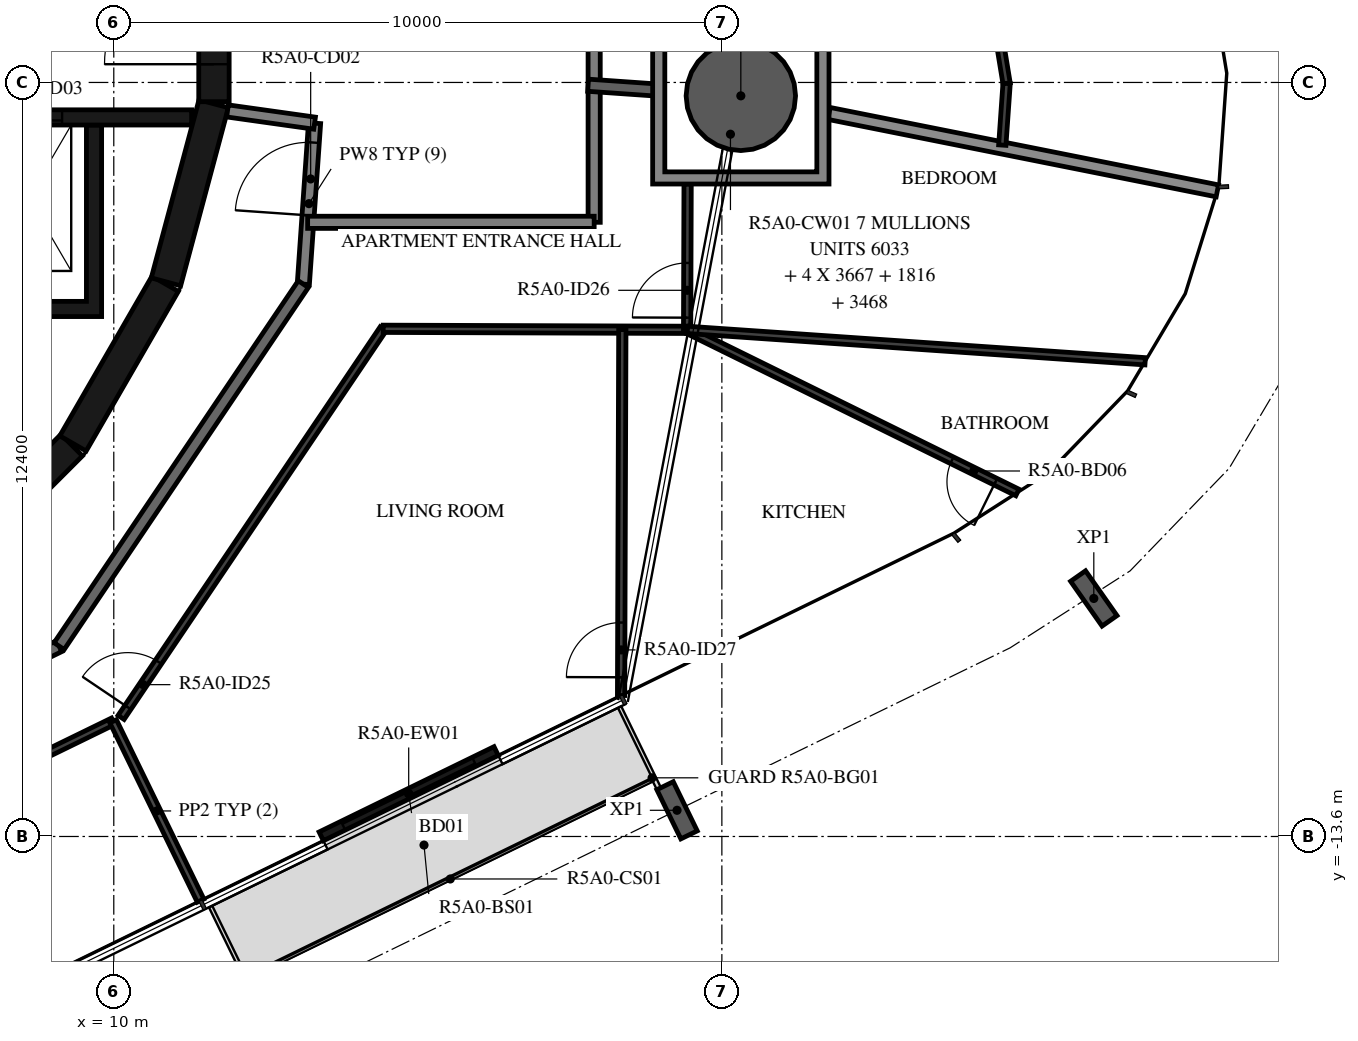
"""IFC4 building model, lengths in metres.
Left out: names, types, materials, properties, quantities, classifications, styles, units other than length and angle.
Written with IfcOpenShell. Run it as: python <this file> out.ifc"""

import sys

from ifc_helpers import new_model, si_unit, direction, frame, frame_2d, origin, origin_2d, place, context, subcontext, project, spatial, polyline, rectangle, hollow_circle, i_section, outline, extrude, element, fill, save


model = new_model("IFC4")
c1 = context("Model", 3, precision=1e-05, world=origin(), true_north=direction((0.0, 1.0)))
c2 = subcontext(c1, "Body", "Model", "MODEL_VIEW")
j1 = project(units=[si_unit("LENGTHUNIT", "METRE"), si_unit("PLANEANGLEUNIT", "RADIAN")], contexts=[c1])
p1 = place(None, origin())
s1 = spatial("IfcSite", under=j1, at=p1, CompositionType="ELEMENT")
p2 = place(p1, origin())
s2 = spatial("IfcBuilding", under=s1, at=p2, CompositionType="ELEMENT")
p3 = place(p2, frame((0.0, 0.0, 195.4)))
s3 = spatial("IfcBuildingStorey", under=s2, at=p3, CompositionType="ELEMENT", Elevation=195.4)
p4 = place(p3, frame((20.312, -1.42, -0.38), z_axis=(0.0, 0.0, 1.0), x_axis=(1.0, 0.0, 0.0)))
e1 = element("IfcColumn", 1, at=p4, inside=s3, PredefinedType="COLUMN", context=c2, shape_type="SweptSolid", body=[
    extrude(hollow_circle(Radius=0.9, WallThickness=0.04, at=origin_2d()), origin(), (0.0, 0.0, 1.0), 3.5),
])
for number, where, z_axis, x_axis in (
    (2, (19.263, -13.169, -0.38), (0.0, 0.0, 1.0), (-0.899, -0.438, 0.0)),
    (3, (26.117, -9.686, -0.38), (0.0, 0.0, 1.0), (-0.818, -0.575, 0.0)),
):
    element("IfcColumn", number, at=place(p3, frame(where, z_axis=z_axis, x_axis=x_axis)), inside=s3, PredefinedType="COLUMN", context=c2, shape_type="SweptSolid", body=[
        extrude(i_section(OverallWidth=0.3, OverallDepth=0.9, WebThickness=0.019, FlangeThickness=0.035, FilletRadius=0.03, at=origin_2d()), origin(), (0.0, 0.0, 1.0), 3.5),
    ])
p5 = place(p3, frame((13.412, -13.598, 0.0), z_axis=(0.0, 0.0, 1.0), x_axis=(0.898793373747, 0.438372525723, 0.0)))
e4 = element("IfcWall", 4, at=p5, inside=s3, PredefinedType="STANDARD", context=c2, shape_type="SweptSolid", body=[
    extrude(rectangle(XDim=3.2, YDim=0.16, at=frame_2d((1.6, 0.0))), origin(), (0.0, 0.0, 1.0), 3.12),
])
p6 = place(p5, frame((0.4, 0.0, 0.0)))
e5 = element("IfcOpeningElement", 5, at=p6, cuts=e4, PredefinedType="OPENING", context=c2, shape_type="SweptSolid", body=[
    extrude(rectangle(XDim=2.4, YDim=2.4, at=frame_2d((1.2, 1.2))), frame((0.0, 0.09, 0.0), z_axis=(0.0, -1.0, 0.0), x_axis=(1.0, 0.0, 0.0)), (0.0, 0.0, 1.0), 0.18),
])
p7 = place(p3, frame((7.164, -9.308, 0.0), z_axis=(0.0, 0.0, 1.0), x_axis=(0.707106781187, 0.707106781187, 0.0)))
e6 = element("IfcWall", 6, at=p7, inside=s3, PredefinedType="SHEAR", context=c2, shape_type="SweptSolid", body=[
    extrude(rectangle(XDim=3.032, YDim=0.5, at=frame_2d((1.516, 0.0))), origin(), (0.0, 0.0, 1.0), 3.12),
])
for number, where, z_axis, x_axis in (
    (7, (9.329, -7.137, 0.0), (0.0, 0.0, 1.0), (0.5, 0.866, 0.0)),
    (8, (10.858, -4.479, 0.0), (0.0, 0.0, 1.0), (0.259, 0.966, 0.0)),
):
    element("IfcWall", number, at=place(p3, frame(where, z_axis=z_axis, x_axis=x_axis)), inside=s3, PredefinedType="SHEAR", context=c2, shape_type="SweptSolid", body=[
        extrude(rectangle(XDim=3.033, YDim=0.5, at=frame_2d((1.516, 0.0))), origin(), (0.0, 0.0, 1.0), 3.12),
    ])
p8 = place(p3, frame((11.647, -1.516, 0.0), z_axis=(0.0, 0.0, 1.0), x_axis=(0.0, 1.0, 0.0)))
e9 = element("IfcWall", 9, at=p8, inside=s3, PredefinedType="SHEAR", context=c2, shape_type="SweptSolid", body=[
    extrude(rectangle(XDim=3.033, YDim=0.5, at=frame_2d((1.516, 0.0))), origin(), (0.0, 0.0, 1.0), 3.12),
])
p9 = place(p8, frame((0.616, 0.0, 0.0)))
e10 = element("IfcOpeningElement", 10, at=p9, cuts=e9, PredefinedType="OPENING", context=c2, shape_type="SweptSolid", body=[
    extrude(rectangle(XDim=1.8, YDim=2.1, at=frame_2d((0.9, 1.05))), frame((0.0, 0.26, 0.0), z_axis=(0.0, -1.0, 0.0), x_axis=(1.0, 0.0, 0.0)), (0.0, 0.0, 1.0), 0.52),
])
p10 = place(p3, origin())
e11 = element("IfcWall", 11, at=p10, inside=s3, PredefinedType="SHEAR", context=c2, shape_type="SweptSolid", body=[
    extrude(outline(polyline([(9.8, -5.05), (9.8, -4.8), (9.8, -1.9), (9.55, -1.9), (9.55, -4.8), (7.65, -4.8), (7.65, -1.9), (7.4, -1.9), (7.4, -4.8), (5.5, -4.8), (5.5, -1.9), (5.25, -1.9), (5.25, -4.8), (3.35, -4.8), (3.35, -1.9), (3.1, -1.9), (3.1, -4.8), (1.2, -4.8), (1.2, -1.9), (0.95, -1.9), (0.95, -4.8), (-0.95, -4.8), (-0.95, -1.9), (-1.2, -1.9), (-1.2, -4.8), (-3.1, -4.8), (-3.1, -1.9), (-3.35, -1.9), (-3.35, -4.8), (-5.25, -4.8), (-5.25, -1.9), (-5.5, -1.9), (-5.5, -4.8), (-7.4, -4.8), (-7.4, -1.9), (-7.65, -1.9), (-7.65, -4.8), (-9.55, -4.8), (-9.55, -1.9), (-9.8, -1.9), (-9.8, -4.8), (-9.8, -5.05), (9.8, -5.05)])), origin(), (0.0, 0.0, 1.0), 3.12),
])
p11 = place(p3, frame((3.35, -1.775, 0.0), z_axis=(0.0, 0.0, 1.0), x_axis=(1.0, 0.0, 0.0)))
e12 = element("IfcWall", 12, at=p11, inside=s3, PredefinedType="SHEAR", context=c2, shape_type="SweptSolid", body=[
    extrude(rectangle(XDim=7.93, YDim=0.25, at=frame_2d((3.965, 0.0))), origin(), (0.0, 0.0, 1.0), 3.12),
])
p12 = place(p11, frame((0.4, 0.0, 0.0)))
e13 = element("IfcOpeningElement", 13, at=p12, cuts=e12, PredefinedType="OPENING", context=c2, shape_type="SweptSolid", body=[
    extrude(rectangle(XDim=1.1, YDim=2.4, at=frame_2d((0.55, 1.2))), frame((0.0, 0.135, 0.0), z_axis=(0.0, -1.0, 0.0), x_axis=(1.0, 0.0, 0.0)), (0.0, 0.0, 1.0), 0.27),
])
p13 = place(p11, frame((2.55, 0.0, 0.0)))
e14 = element("IfcOpeningElement", 14, at=p13, cuts=e12, PredefinedType="OPENING", context=c2, shape_type="SweptSolid", body=[
    extrude(rectangle(XDim=1.1, YDim=2.4, at=frame_2d((0.55, 1.2))), frame((0.0, 0.135, 0.0), z_axis=(0.0, -1.0, 0.0), x_axis=(1.0, 0.0, 0.0)), (0.0, 0.0, 1.0), 0.27),
])
p14 = place(p11, frame((4.7, 0.0, 0.0)))
e15 = element("IfcOpeningElement", 15, at=p14, cuts=e12, PredefinedType="OPENING", context=c2, shape_type="SweptSolid", body=[
    extrude(rectangle(XDim=1.1, YDim=2.4, at=frame_2d((0.55, 1.2))), frame((0.0, 0.135, 0.0), z_axis=(0.0, -1.0, 0.0), x_axis=(1.0, 0.0, 0.0)), (0.0, 0.0, 1.0), 0.27),
])
p15 = place(p3, frame((13.117, -4.517, 0.0), z_axis=(0.0, 0.0, 1.0), x_axis=(0.069736659613, 0.997565435601, 0.0)))
e16 = element("IfcWall", 16, at=p15, inside=s3, PredefinedType="STANDARD", context=c2, shape_type="SweptSolid", body=[
    extrude(rectangle(XDim=2.654, YDim=0.2, at=frame_2d((1.327, 0.0))), origin(), (0.0, 0.0, 1.0), 3.12),
])
p16 = place(p15, frame((1.134, 0.0, 0.0)))
e17 = element("IfcOpeningElement", 17, at=p16, cuts=e16, PredefinedType="OPENING", context=c2, shape_type="SweptSolid", body=[
    extrude(rectangle(XDim=1.2, YDim=2.1, at=frame_2d((0.6, 1.05))), frame((0.0, 0.11, 0.0), z_axis=(0.0, -1.0, 0.0), x_axis=(1.0, 0.0, 0.0)), (0.0, 0.0, 1.0), 0.22),
])
p17 = place(p3, frame((13.302, -1.869, 0.0), z_axis=(0.0, 0.0, 1.0), x_axis=(-0.990274397042, 0.13912806533, 0.0)))
e18 = element("IfcWall", 18, at=p17, inside=s3, PredefinedType="STANDARD", context=c2, shape_type="SweptSolid", body=[
    extrude(rectangle(XDim=1.446, YDim=0.2, at=frame_2d((0.723, 0.0))), origin(), (0.0, 0.0, 1.0), 3.12),
])
p18 = place(p3, frame((2.647, -13.618, 0.0), z_axis=(0.0, 0.0, 1.0), x_axis=(0.898796543751, 0.438366026218, 0.0)))
e19 = element("IfcWall", 19, at=p18, inside=s3, PredefinedType="STANDARD", context=c2, shape_type="SweptSolid", body=[
    extrude(rectangle(XDim=7.181, YDim=0.2, at=frame_2d((3.591, 0.0))), origin(), (0.0, 0.0, 1.0), 3.12),
])
p19 = place(p18, frame((0.2, 0.0, 0.0)))
e20 = element("IfcOpeningElement", 20, at=p19, cuts=e19, PredefinedType="OPENING", context=c2, shape_type="SweptSolid", body=[
    extrude(rectangle(XDim=1.0, YDim=2.1, at=frame_2d((0.5, 1.05))), frame((0.0, 0.11, 0.0), z_axis=(0.0, -1.0, 0.0), x_axis=(1.0, 0.0, 0.0)), (0.0, 0.0, 1.0), 0.22),
])
p20 = place(p3, frame((9.101, -10.47, 0.0), z_axis=(0.0, 0.0, 1.0), x_axis=(0.559195469534, 0.829035841718, 0.0)))
e21 = element("IfcWall", 21, at=p20, inside=s3, PredefinedType="STANDARD", context=c2, shape_type="SweptSolid", body=[
    extrude(rectangle(XDim=7.181, YDim=0.2, at=frame_2d((3.591, 0.0))), origin(), (0.0, 0.0, 1.0), 3.12),
])
p21 = place(p3, frame((17.9, -3.5, 0.0), z_axis=(0.0, 0.0, 1.0), x_axis=(0.0, 1.0, 0.0)))
e22 = element("IfcWall", 22, at=p21, inside=s3, PredefinedType="STANDARD", context=c2, shape_type="SweptSolid", body=[
    extrude(rectangle(XDim=7.0, YDim=0.2, at=frame_2d((3.5, 0.0))), origin(), (0.0, 0.0, 1.0), 3.12),
])
p22 = place(p3, frame((13.188, -3.5, 0.0), z_axis=(0.0, 0.0, 1.0), x_axis=(1.0, 0.0, 0.0)))
e23 = element("IfcWall", 23, at=p22, inside=s3, PredefinedType="STANDARD", context=c2, shape_type="SweptSolid", body=[
    extrude(rectangle(XDim=4.712, YDim=0.2, at=frame_2d((2.356, 0.0))), origin(), (0.0, 0.0, 1.0), 3.12),
])
p23 = place(p3, frame((21.762, -1.709, 0.0), z_axis=(0.0, 0.0, 1.0), x_axis=(0.980707365343, -0.195481619501, 0.0)))
e24 = element("IfcWall", 24, at=p23, inside=s3, PredefinedType="STANDARD", context=c2, shape_type="SweptSolid", body=[
    extrude(rectangle(XDim=6.512, YDim=0.2, at=frame_2d((3.256, 0.0))), origin(), (0.0, 0.0, 1.0), 2.73),
])
p24 = place(p3, frame((17.8, -1.246, 0.0), z_axis=(0.0, 0.0, 1.0), x_axis=(0.997562681713, -0.069776042122, 0.0)))
e25 = element("IfcWall", 25, at=p24, inside=s3, PredefinedType="STANDARD", context=c2, shape_type="SweptSolid", body=[
    extrude(rectangle(XDim=1.144, YDim=0.2, at=frame_2d((0.572, 0.0))), origin(), (0.0, 0.0, 1.0), 3.12),
])
for number, where, z_axis, x_axis in (
    (26, (24.518, -0.214, 0.0), (0.0, 0.0, 1.0), (0.162, -0.987, 0.0)),
    (27, (24.683, -1.217, 0.0), (0.0, 0.0, 1.0), (-0.07, -0.998, 0.0)),
):
    element("IfcWall", number, at=place(p3, frame(where, z_axis=z_axis, x_axis=x_axis)), inside=s3, PredefinedType="PARTITIONING", context=c2, shape_type="SweptSolid", body=[
        extrude(rectangle(XDim=1.016, YDim=0.12, at=frame_2d((0.508, 0.0))), origin(), (0.0, 0.0, 1.0), 3.12),
    ])
p25 = place(p3, frame((3.074, -15.078, 0.0), z_axis=(0.0, 0.0, 1.0), x_axis=(0.898800770739, 0.438357359377, 0.0)))
e28 = element("IfcWall", 28, at=p25, inside=s3, PredefinedType="PARTITIONING", context=c2, shape_type="SweptSolid", body=[
    extrude(rectangle(XDim=7.694, YDim=0.12, at=frame_2d((3.847, 0.0))), origin(), (0.0, 0.0, 1.0), 3.12),
])
p26 = place(p25, frame((0.2, 0.0, 0.0)))
e29 = element("IfcOpeningElement", 29, at=p26, cuts=e28, PredefinedType="OPENING", context=c2, shape_type="SweptSolid", body=[
    extrude(rectangle(XDim=0.9, YDim=2.1, at=frame_2d((0.45, 1.05))), frame((0.0, 0.07, 0.0), z_axis=(0.0, -1.0, 0.0), x_axis=(1.0, 0.0, 0.0)), (0.0, 0.0, 1.0), 0.14),
])
p27 = place(p3, frame((10.12, -11.642, 0.0), z_axis=(0.0, 0.0, 1.0), x_axis=(0.559201404667, 0.829031838362, 0.0)))
e30 = element("IfcWall", 30, at=p27, inside=s3, PredefinedType="PARTITIONING", context=c2, shape_type="SweptSolid", body=[
    extrude(rectangle(XDim=7.709, YDim=0.12, at=frame_2d((3.854, 0.0))), origin(), (0.0, 0.0, 1.0), 3.12),
])
p28 = place(p27, frame((0.2, 0.0, 0.0)))
e31 = element("IfcOpeningElement", 31, at=p28, cuts=e30, PredefinedType="OPENING", context=c2, shape_type="SweptSolid", body=[
    extrude(rectangle(XDim=0.9, YDim=2.1, at=frame_2d((0.45, 1.05))), frame((0.0, 0.07, 0.0), z_axis=(0.0, -1.0, 0.0), x_axis=(1.0, 0.0, 0.0)), (0.0, 0.0, 1.0), 0.14),
])
p29 = place(p3, frame((14.431, -5.251, 0.0), z_axis=(0.0, 0.0, 1.0), x_axis=(0.999994153659, -0.003419451456, 0.0)))
e32 = element("IfcWall", 32, at=p29, inside=s3, PredefinedType="PARTITIONING", context=c2, shape_type="SweptSolid", body=[
    extrude(rectangle(XDim=4.998, YDim=0.12, at=frame_2d((2.499, 0.0))), origin(), (0.0, 0.0, 1.0), 3.12),
])
p30 = place(p3, frame((19.429, -5.268, 0.0), z_axis=(0.0, 0.0, 1.0), x_axis=(0.003360127656, 0.999994354755, 0.0)))
e33 = element("IfcWall", 33, at=p30, inside=s3, PredefinedType="PARTITIONING", context=c2, shape_type="SweptSolid", body=[
    extrude(rectangle(XDim=2.398, YDim=0.12, at=frame_2d((1.199, 0.0))), origin(), (0.0, 0.0, 1.0), 3.12),
])
p31 = place(p30, frame((0.2, 0.0, 0.0)))
e34 = element("IfcOpeningElement", 34, at=p31, cuts=e33, PredefinedType="OPENING", context=c2, shape_type="SweptSolid", body=[
    extrude(rectangle(XDim=0.9, YDim=2.1, at=frame_2d((0.45, 1.05))), frame((0.0, 0.07, 0.0), z_axis=(0.0, -1.0, 0.0), x_axis=(1.0, 0.0, 0.0)), (0.0, 0.0, 1.0), 0.14),
])
p32 = place(p3, frame((11.427, -14.654, 0.0), z_axis=(0.0, 0.0, 1.0), x_axis=(-0.438410435857, 0.898774882677, 0.0)))
e35 = element("IfcWall", 35, at=p32, inside=s3, PredefinedType="PARTITIONING", context=c2, shape_type="SweptSolid", body=[
    extrude(rectangle(XDim=3.281, YDim=0.12, at=frame_2d((1.64, 0.0))), origin(), (0.0, 0.0, 1.0), 2.73),
])
p33 = place(p3, frame((18.343, -11.282, 0.0), z_axis=(0.0, 0.0, 1.0), x_axis=(0.003448675073, 0.999994053302, 0.0)))
e36 = element("IfcWall", 36, at=p33, inside=s3, PredefinedType="PARTITIONING", context=c2, shape_type="SweptSolid", body=[
    extrude(rectangle(XDim=6.017, YDim=0.12, at=frame_2d((3.009, 0.0))), origin(), (0.0, 0.0, 1.0), 3.12),
])
p34 = place(p33, frame((0.3, 0.0, 0.0)))
e37 = element("IfcOpeningElement", 37, at=p34, cuts=e36, PredefinedType="OPENING", context=c2, shape_type="SweptSolid", body=[
    extrude(rectangle(XDim=0.9, YDim=2.1, at=frame_2d((0.45, 1.05))), frame((0.0, 0.07, 0.0), z_axis=(0.0, -1.0, 0.0), x_axis=(1.0, 0.0, 0.0)), (0.0, 0.0, 1.0), 0.14),
])
p35 = place(p3, frame((24.861, -7.943, 0.0), z_axis=(0.0, 0.0, 1.0), x_axis=(-0.897128390861, 0.441769906525, 0.0)))
e38 = element("IfcWall", 38, at=p35, inside=s3, PredefinedType="PARTITIONING", context=c2, shape_type="SweptSolid", body=[
    extrude(rectangle(XDim=6.055, YDim=0.12, at=frame_2d((3.027, 0.0))), origin(), (0.0, 0.0, 1.0), 3.12),
])
p36 = place(p35, frame((0.4, 0.0, 0.0)))
e39 = element("IfcOpeningElement", 39, at=p36, cuts=e38, PredefinedType="OPENING", context=c2, shape_type="SweptSolid", body=[
    extrude(rectangle(XDim=0.8, YDim=2.1, at=frame_2d((0.4, 1.05))), frame((0.0, 0.07, 0.0), z_axis=(0.0, -1.0, 0.0), x_axis=(1.0, 0.0, 0.0)), (0.0, 0.0, 1.0), 0.14),
])
p37 = place(p3, frame((26.961, -5.785, 0.0), z_axis=(0.0, 0.0, 1.0), x_axis=(-0.997652165985, 0.068484711466, 0.0)))
e40 = element("IfcWall", 40, at=p37, inside=s3, PredefinedType="PARTITIONING", context=c2, shape_type="SweptSolid", body=[
    extrude(rectangle(XDim=7.551, YDim=0.12, at=frame_2d((3.775, 0.0))), origin(), (0.0, 0.0, 1.0), 3.12),
])
p38 = place(p3, origin())
e41 = element("IfcWall", 41, at=p38, inside=s3, PredefinedType="STANDARD", context=c2, shape_type="SweptSolid", body=[
    extrude(outline(polyline([(21.762, 0.03), (21.762, -2.87), (18.862, -2.87), (18.862, 0.03), (21.762, 0.03)]), holes=[polyline([(19.062, -2.67), (21.562, -2.67), (21.562, -0.17), (19.062, -0.17), (19.062, -2.67)])]), origin(), (0.0, 0.0, 1.0), 3.12),
])
p39 = place(p6, origin())
e42 = element("IfcDoor", 42, at=p39, inside=s3, OperationType="DOUBLE_DOOR_SLIDING", PredefinedType="DOOR", context=c2, shape_type="SweptSolid", body=[
    extrude(rectangle(XDim=2.4, YDim=2.4, at=frame_2d((1.2, 1.2))), frame((0.0, 0.025, 0.0), z_axis=(0.0, -1.0, 0.0), x_axis=(1.0, 0.0, 0.0)), (0.0, 0.0, 1.0), 0.05),
])
fill(e5, e42)
p40 = place(p9, origin())
e43 = element("IfcDoor", 43, at=p40, inside=s3, OperationType="DOUBLE_DOOR_SINGLE_SWING", PredefinedType="DOOR", context=c2, shape_type="SweptSolid", body=[
    extrude(rectangle(XDim=1.8, YDim=2.1, at=frame_2d((0.9, 1.05))), frame((0.0, 0.025, 0.0), z_axis=(0.0, -1.0, 0.0), x_axis=(1.0, 0.0, 0.0)), (0.0, 0.0, 1.0), 0.05),
])
fill(e10, e43)
p41 = place(p14, origin())
e44 = element("IfcDoor", 44, at=p41, inside=s3, OperationType="DOUBLE_DOOR_SLIDING", PredefinedType="DOOR", context=c2, shape_type="SweptSolid", body=[
    extrude(rectangle(XDim=1.1, YDim=2.4, at=frame_2d((0.55, 1.2))), frame((0.0, 0.025, 0.0), z_axis=(0.0, -1.0, 0.0), x_axis=(1.0, 0.0, 0.0)), (0.0, 0.0, 1.0), 0.05),
])
fill(e15, e44)
p42 = place(p28, origin())
e45 = element("IfcDoor", 45, at=p42, inside=s3, OperationType="SINGLE_SWING_RIGHT", PredefinedType="DOOR", context=c2, shape_type="SweptSolid", body=[
    extrude(rectangle(XDim=0.9, YDim=2.1, at=frame_2d((0.45, 1.05))), frame((0.0, 0.025, 0.0), z_axis=(0.0, -1.0, 0.0), x_axis=(1.0, 0.0, 0.0)), (0.0, 0.0, 1.0), 0.05),
])
fill(e31, e45)
p43 = place(p31, origin())
e46 = element("IfcDoor", 46, at=p43, inside=s3, OperationType="SINGLE_SWING_RIGHT", PredefinedType="DOOR", context=c2, shape_type="SweptSolid", body=[
    extrude(rectangle(XDim=0.9, YDim=2.1, at=frame_2d((0.45, 1.05))), frame((0.0, 0.025, 0.0), z_axis=(0.0, -1.0, 0.0), x_axis=(1.0, 0.0, 0.0)), (0.0, 0.0, 1.0), 0.05),
])
fill(e34, e46)
p44 = place(p34, origin())
e47 = element("IfcDoor", 47, at=p44, inside=s3, OperationType="SINGLE_SWING_RIGHT", PredefinedType="DOOR", context=c2, shape_type="SweptSolid", body=[
    extrude(rectangle(XDim=0.9, YDim=2.1, at=frame_2d((0.45, 1.05))), frame((0.0, 0.025, 0.0), z_axis=(0.0, -1.0, 0.0), x_axis=(1.0, 0.0, 0.0)), (0.0, 0.0, 1.0), 0.05),
])
fill(e37, e47)
p45 = place(p36, origin())
e48 = element("IfcDoor", 48, at=p45, inside=s3, OperationType="SINGLE_SWING_RIGHT", PredefinedType="DOOR", context=c2, shape_type="SweptSolid", body=[
    extrude(rectangle(XDim=0.8, YDim=2.1, at=frame_2d((0.4, 1.05))), frame((0.0, 0.025, 0.0), z_axis=(0.0, -1.0, 0.0), x_axis=(1.0, 0.0, 0.0)), (0.0, 0.0, 1.0), 0.05),
])
fill(e39, e48)
p46 = place(p16, origin())
e49 = element("IfcDoor", 49, at=p46, inside=s3, OperationType="DOUBLE_DOOR_SINGLE_SWING", PredefinedType="DOOR", context=c2, shape_type="SweptSolid", body=[
    extrude(rectangle(XDim=1.2, YDim=2.1, at=frame_2d((0.6, 1.05))), frame((0.0, 0.025, 0.0), z_axis=(0.0, -1.0, 0.0), x_axis=(1.0, 0.0, 0.0)), (0.0, 0.0, 1.0), 0.05),
])
fill(e17, e49)
save(model, sys.argv[1])
